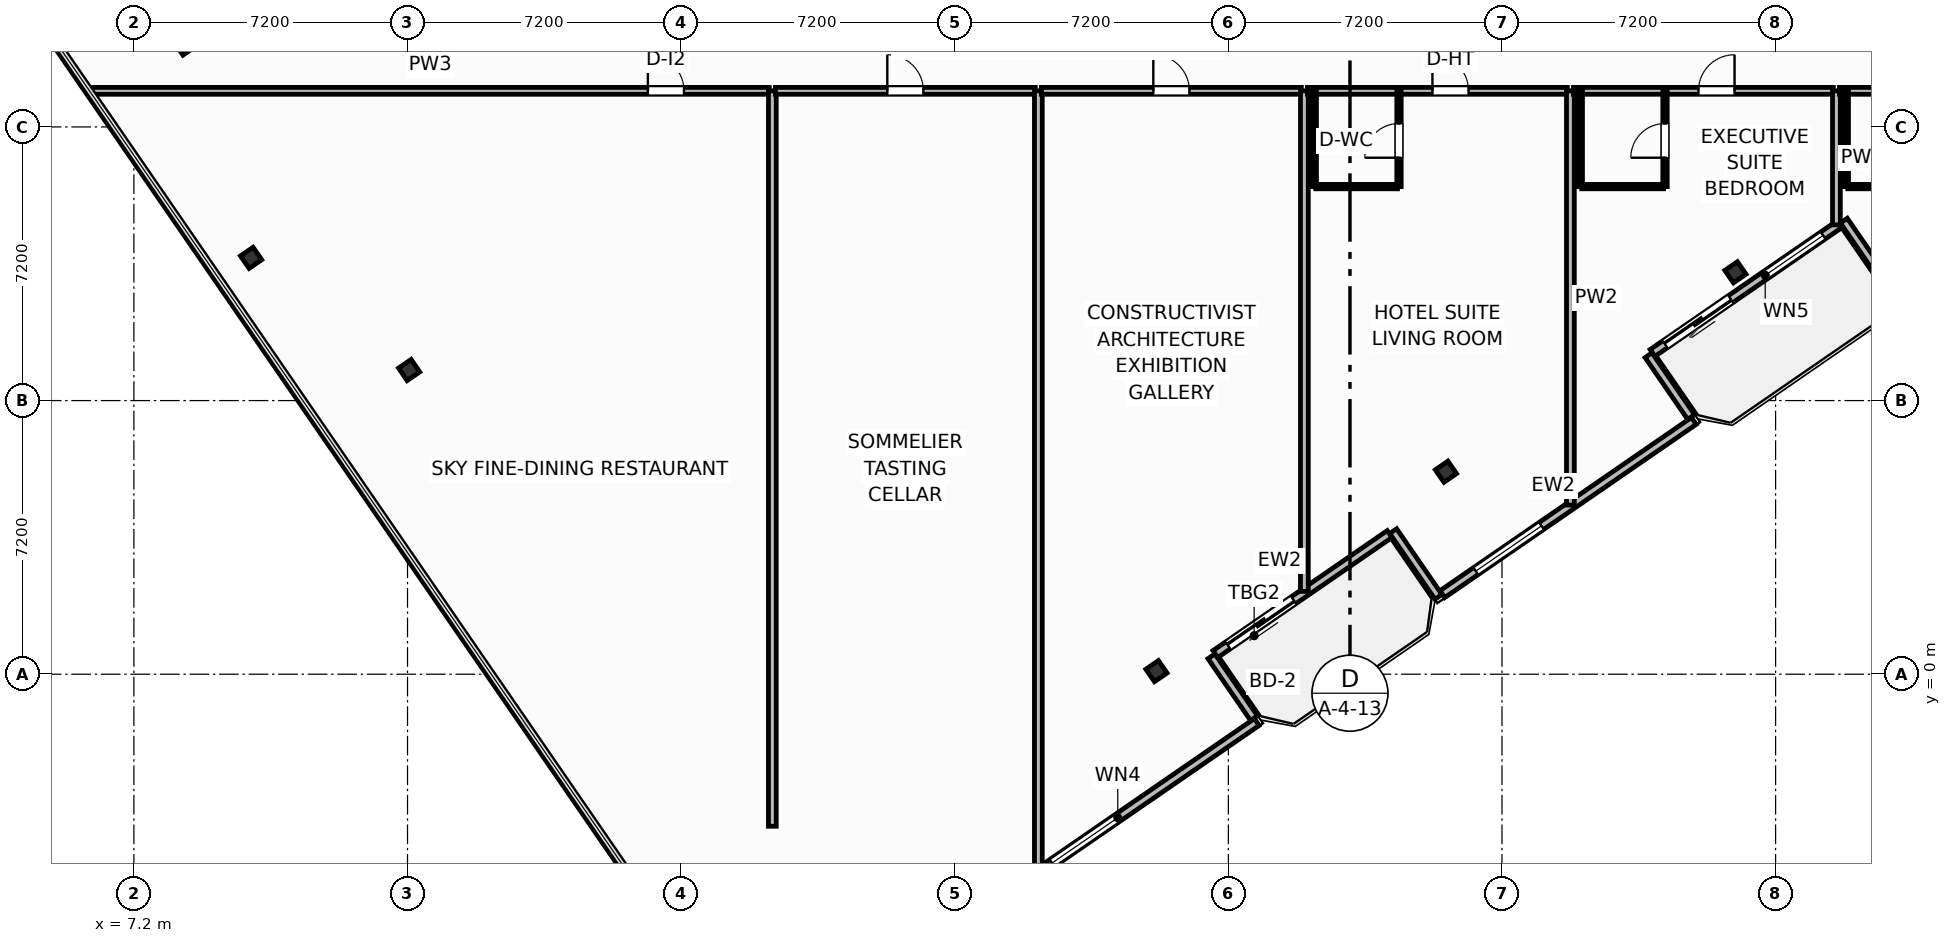
"""IFC4 building model, lengths in metres.
Left out: names, types, materials, properties, quantities, classifications, styles, units other than length and angle.
Written with IfcOpenShell. Run it as: python <this file> out.ifc"""

import sys

from ifc_helpers import new_model, si_unit, direction, frame, frame_2d, origin, origin_2d, place, context, subcontext, project, spatial, rectangle, i_section, extrude, element, fill, save


model = new_model("IFC4")
c1 = context("Model", 3, precision=1e-05, world=origin(), true_north=direction((0.0, 1.0)))
c2 = subcontext(c1, "Body", "Model", "MODEL_VIEW")
j1 = project(units=[si_unit("LENGTHUNIT", "METRE"), si_unit("PLANEANGLEUNIT", "RADIAN")], contexts=[c1])
p1 = place(None, origin())
s1 = spatial("IfcSite", under=j1, at=p1, CompositionType="ELEMENT")
p2 = place(p1, origin())
s2 = spatial("IfcBuilding", under=s1, at=p2, CompositionType="ELEMENT")
p3 = place(p2, frame((0.0, 0.0, 261.9)))
s3 = spatial("IfcBuildingStorey", under=s2, at=p3, CompositionType="ELEMENT", Elevation=261.9)
for number, where, z_axis, x_axis in (
    (1, (34.107, 0.081, 0.0), (0.0, 0.0, 1.0), (0.824, 0.567, 0.0)),
    (2, (41.725, 5.328, 0.0), (0.0, 0.0, 1.0), (0.824, 0.567, 0.0)),
    (3, (49.343, 10.575, 0.0), (0.0, 0.0, 1.0), (0.824, 0.567, 0.0)),
    (4, (8.543, 16.569, 0.0), (0.0, 0.0, 1.0), (0.824, 0.567, 0.0)),
    (5, (10.284, 10.956, 0.0), (0.0, 0.0, 1.0), (0.824, 0.567, 0.0)),
    (6, (14.443, 8.004, 0.0), (0.0, 0.0, 1.0), (0.824, 0.567, 0.0)),
):
    element("IfcColumn", number, at=place(p3, frame(where, z_axis=z_axis, x_axis=x_axis)), inside=s3, PredefinedType="COLUMN", context=c2, shape_type="SweptSolid", body=[
        extrude(i_section(OverallWidth=0.401, OverallDepth=0.399, WebThickness=0.025, FlangeThickness=0.04, FilletRadius=0.022, at=origin_2d()), origin(), (0.0, 0.0, 1.0), 3.7),
    ])
p4 = place(p3, frame((40.244, 3.688, 0.0), z_axis=(0.0, 0.0, 1.0), x_axis=(-0.823541290762, -0.567256328665, 0.0)))
e7 = element("IfcWall", 7, at=p4, inside=s3, PredefinedType="SOLIDWALL", context=c2, shape_type="SweptSolid", body=[
    extrude(rectangle(XDim=5.567, YDim=0.22, at=frame_2d((2.784, 0.0))), origin(), (0.0, 0.0, 1.0), 2.73),
])
p5 = place(p4, frame((3.067, 0.0, 0.0)))
e8 = element("IfcOpeningElement", 8, at=p5, cuts=e7, PredefinedType="OPENING", context=c2, shape_type="SweptSolid", body=[
    extrude(rectangle(XDim=2.1, YDim=2.3, at=frame_2d((1.05, 1.15))), frame((0.0, 0.12, 0.0), z_axis=(0.0, -1.0, 0.0), x_axis=(1.0, 0.0, 0.0)), (0.0, 0.0, 1.0), 0.24),
])
p6 = place(p3, frame((52.103, 11.857, 0.0), z_axis=(0.0, 0.0, 1.0), x_axis=(-0.823534636215, -0.567265989598, 0.0)))
e9 = element("IfcWall", 9, at=p6, inside=s3, PredefinedType="SOLIDWALL", context=c2, shape_type="SweptSolid", body=[
    extrude(rectangle(XDim=6.0, YDim=0.22, at=frame_2d((3.0, 0.0))), origin(), (0.0, 0.0, 1.0), 2.73),
])
p7 = place(p6, frame((3.5, 0.0, 0.0)))
e10 = element("IfcOpeningElement", 10, at=p7, cuts=e9, PredefinedType="OPENING", context=c2, shape_type="SweptSolid", body=[
    extrude(rectangle(XDim=2.1, YDim=2.3, at=frame_2d((1.05, 1.15))), frame((0.0, 0.12, 0.0), z_axis=(0.0, -1.0, 0.0), x_axis=(1.0, 0.0, 0.0)), (0.0, 0.0, 1.0), 0.24),
])
p8 = place(p6, frame((0.55, 0.0, 0.75)))
e11 = element("IfcOpeningElement", 11, at=p8, cuts=e9, PredefinedType="OPENING", context=c2, shape_type="SweptSolid", body=[
    extrude(rectangle(XDim=1.85, YDim=1.75, at=frame_2d((0.925, 0.875))), frame((0.0, 0.12, 0.0), z_axis=(0.0, -1.0, 0.0), x_axis=(1.0, 0.0, 0.0)), (0.0, 0.0, 1.0), 0.24),
])
p9 = place(p3, frame((27.704, -7.488, 0.0), z_axis=(0.0, 0.0, 1.0), x_axis=(0.823529068157, 0.567274073003, 0.0)))
e12 = element("IfcWall", 12, at=p9, inside=s3, PredefinedType="SOLIDWALL", context=c2, shape_type="SweptSolid", body=[
    extrude(rectangle(XDim=10.98, YDim=0.22, at=frame_2d((5.49, 0.0))), origin(), (0.0, 0.0, 1.0), 2.73),
])
p10 = place(p9, frame((4.44, 0.0, 0.8)))
e13 = element("IfcOpeningElement", 13, at=p10, cuts=e12, PredefinedType="OPENING", context=c2, shape_type="SweptSolid", body=[
    extrude(rectangle(XDim=2.1, YDim=1.75, at=frame_2d((1.05, 0.875))), frame((0.0, 0.12, 0.0), z_axis=(0.0, -1.0, 0.0), x_axis=(1.0, 0.0, 0.0)), (0.0, 0.0, 1.0), 0.24),
])
p11 = place(p3, frame((36.675, -1.156, 0.0), z_axis=(0.0, 0.0, 1.0), x_axis=(-0.567215821234, 0.823569190865, 0.0)))
e14 = element("IfcWall", 14, at=p11, inside=s3, PredefinedType="SOLIDWALL", context=c2, shape_type="SweptSolid", body=[
    extrude(rectangle(XDim=1.975, YDim=0.22, at=frame_2d((0.988, 0.0))), origin(), (0.0, 0.0, 1.0), 2.73),
])
p12 = place(p3, frame((40.337, 3.765, 0.0), z_axis=(0.0, 0.0, 1.0), x_axis=(0.567352541689, -0.823475010816, 0.0)))
e15 = element("IfcWall", 15, at=p12, inside=s3, PredefinedType="SOLIDWALL", context=c2, shape_type="SweptSolid", body=[
    extrude(rectangle(XDim=2.1, YDim=0.22, at=frame_2d((1.05, 0.0))), origin(), (0.0, 0.0, 1.0), 2.73),
])
p13 = place(p3, frame((41.631, 2.106, 0.0), z_axis=(0.0, 0.0, 1.0), x_axis=(0.823530942962, 0.56727135128, 0.0)))
e16 = element("IfcWall", 16, at=p13, inside=s3, PredefinedType="SOLIDWALL", context=c2, shape_type="SweptSolid", body=[
    extrude(rectangle(XDim=8.035, YDim=0.22, at=frame_2d((4.018, 0.0))), origin(), (0.0, 0.0, 1.0), 2.73),
])
p14 = place(p13, frame((1.068, 0.0, 0.8)))
e17 = element("IfcOpeningElement", 17, at=p14, cuts=e16, PredefinedType="OPENING", context=c2, shape_type="SweptSolid", body=[
    extrude(rectangle(XDim=2.1, YDim=1.75, at=frame_2d((1.05, 0.875))), frame((0.0, 0.12, 0.0), z_axis=(0.0, -1.0, 0.0), x_axis=(1.0, 0.0, 0.0)), (0.0, 0.0, 1.0), 0.24),
])
p15 = place(p3, frame((48.177, 6.767, 0.0), z_axis=(0.0, 0.0, 1.0), x_axis=(-0.567273565974, 0.823529417415, 0.0)))
e18 = element("IfcWall", 18, at=p15, inside=s3, PredefinedType="SOLIDWALL", context=c2, shape_type="SweptSolid", body=[
    extrude(rectangle(XDim=1.975, YDim=0.22, at=frame_2d((0.988, 0.0))), origin(), (0.0, 0.0, 1.0), 2.73),
])
p16 = place(p3, frame((52.196, 11.933, 0.0), z_axis=(0.0, 0.0, 1.0), x_axis=(0.56729822855, -0.823512428494, 0.0)))
e19 = element("IfcWall", 19, at=p16, inside=s3, PredefinedType="SOLIDWALL", context=c2, shape_type="SweptSolid", body=[
    extrude(rectangle(XDim=2.1, YDim=0.22, at=frame_2d((1.05, 0.0))), origin(), (0.0, 0.0, 1.0), 2.73),
])
p17 = place(p3, frame((6.071, 15.35, 0.0), z_axis=(0.0, 0.0, 1.0), x_axis=(1.0, 0.0, 0.0)))
e20 = element("IfcWall", 20, at=p17, inside=s3, PredefinedType="PARTITIONING", context=c2, shape_type="SweptSolid", body=[
    extrude(rectangle(XDim=17.849, YDim=0.18, at=frame_2d((8.924, 0.0))), origin(), (0.0, 0.0, 1.0), 3.45),
])
p18 = place(p17, frame((14.654, 0.0, 0.0)))
e21 = element("IfcOpeningElement", 21, at=p18, cuts=e20, PredefinedType="OPENING", context=c2, shape_type="SweptSolid", body=[
    extrude(rectangle(XDim=0.95, YDim=2.05, at=frame_2d((0.475, 1.025))), frame((0.0, 0.1, 0.0), z_axis=(0.0, -1.0, 0.0), x_axis=(1.0, 0.0, 0.0)), (0.0, 0.0, 1.0), 0.2),
])
p19 = place(p3, frame((24.0, -4.0, 0.0), z_axis=(0.0, 0.0, 1.0), x_axis=(0.0, 1.0, 0.0)))
e22 = element("IfcWall", 22, at=p19, inside=s3, PredefinedType="PARTITIONING", context=c2, shape_type="SweptSolid", body=[
    extrude(rectangle(XDim=19.35, YDim=0.205, at=frame_2d((9.675, 0.0))), origin(), (0.0, 0.0, 1.0), 3.45),
])
p20 = place(p3, frame((24.08, 15.35, 0.0), z_axis=(0.0, 0.0, 1.0), x_axis=(1.0, 0.0, 0.0)))
e23 = element("IfcWall", 23, at=p20, inside=s3, PredefinedType="PARTITIONING", context=c2, shape_type="SweptSolid", body=[
    extrude(rectangle(XDim=6.84, YDim=0.18, at=frame_2d((3.42, 0.0))), origin(), (0.0, 0.0, 1.0), 3.45),
])
p21 = place(p20, frame((2.945, 0.0, 0.0)))
e24 = element("IfcOpeningElement", 24, at=p21, cuts=e23, PredefinedType="OPENING", context=c2, shape_type="SweptSolid", body=[
    extrude(rectangle(XDim=0.95, YDim=2.05, at=frame_2d((0.475, 1.025))), frame((0.0, 0.1, 0.0), z_axis=(0.0, -1.0, 0.0), x_axis=(1.0, 0.0, 0.0)), (0.0, 0.0, 1.0), 0.2),
])
p22 = place(p3, frame((31.0, -5.112, 0.0), z_axis=(0.0, 0.0, 1.0), x_axis=(0.0, 1.0, 0.0)))
e25 = element("IfcWall", 25, at=p22, inside=s3, PredefinedType="PARTITIONING", context=c2, shape_type="SweptSolid", body=[
    extrude(rectangle(XDim=20.462, YDim=0.205, at=frame_2d((10.231, 0.0))), origin(), (0.0, 0.0, 1.0), 3.45),
])
p23 = place(p3, frame((31.08, 15.35, 0.0), z_axis=(0.0, 0.0, 1.0), x_axis=(1.0, 0.0, 0.0)))
e26 = element("IfcWall", 26, at=p23, inside=s3, PredefinedType="PARTITIONING", context=c2, shape_type="SweptSolid", body=[
    extrude(rectangle(XDim=6.84, YDim=0.18, at=frame_2d((3.42, 0.0))), origin(), (0.0, 0.0, 1.0), 3.45),
])
p24 = place(p23, frame((2.945, 0.0, 0.0)))
e27 = element("IfcOpeningElement", 27, at=p24, cuts=e26, PredefinedType="OPENING", context=c2, shape_type="SweptSolid", body=[
    extrude(rectangle(XDim=0.95, YDim=2.05, at=frame_2d((0.475, 1.025))), frame((0.0, 0.1, 0.0), z_axis=(0.0, -1.0, 0.0), x_axis=(1.0, 0.0, 0.0)), (0.0, 0.0, 1.0), 0.2),
])
p25 = place(p3, frame((38.0, 2.179, 0.0), z_axis=(0.0, 0.0, 1.0), x_axis=(0.0, 1.0, 0.0)))
e28 = element("IfcWall", 28, at=p25, inside=s3, PredefinedType="PARTITIONING", context=c2, shape_type="SweptSolid", body=[
    extrude(rectangle(XDim=13.171, YDim=0.205, at=frame_2d((6.585, 0.0))), origin(), (0.0, 0.0, 1.0), 3.45),
])
p26 = place(p3, frame((38.08, 15.35, 0.0), z_axis=(0.0, 0.0, 1.0), x_axis=(1.0, 0.0, 0.0)))
e29 = element("IfcWall", 29, at=p26, inside=s3, PredefinedType="PARTITIONING", context=c2, shape_type="SweptSolid", body=[
    extrude(rectangle(XDim=6.84, YDim=0.18, at=frame_2d((3.42, 0.0))), origin(), (0.0, 0.0, 1.0), 3.45),
])
p27 = place(p26, frame((3.29, 0.0, 0.0)))
e30 = element("IfcOpeningElement", 30, at=p27, cuts=e29, PredefinedType="OPENING", context=c2, shape_type="SweptSolid", body=[
    extrude(rectangle(XDim=0.95, YDim=2.15, at=frame_2d((0.475, 1.075))), frame((0.0, 0.1, 0.0), z_axis=(0.0, -1.0, 0.0), x_axis=(1.0, 0.0, 0.0)), (0.0, 0.0, 1.0), 0.2),
])
p28 = place(p3, frame((38.3, 12.83, 0.0), z_axis=(0.0, 0.0, 1.0), x_axis=(1.0, 0.0, 0.0)))
e31 = element("IfcWall", 31, at=p28, inside=s3, PredefinedType="PARTITIONING", context=c2, shape_type="SweptSolid", body=[
    extrude(rectangle(XDim=2.15, YDim=0.115, at=frame_2d((1.075, 0.0))), origin(), (0.0, 0.0, 1.0), 3.45),
])
p29 = place(p3, frame((40.49, 12.83, 0.0), z_axis=(0.0, 0.0, 1.0), x_axis=(0.0, 1.0, 0.0)))
e32 = element("IfcWall", 32, at=p29, inside=s3, PredefinedType="PARTITIONING", context=c2, shape_type="SweptSolid", body=[
    extrude(rectangle(XDim=2.52, YDim=0.115, at=frame_2d((1.26, 0.0))), origin(), (0.0, 0.0, 1.0), 3.45),
])
p30 = place(p29, frame((0.76, 0.0, 0.0)))
e33 = element("IfcOpeningElement", 33, at=p30, cuts=e32, PredefinedType="OPENING", context=c2, shape_type="SweptSolid", body=[
    extrude(rectangle(XDim=0.9, YDim=2.05, at=frame_2d((0.45, 1.025))), frame((0.0, 0.067, 0.0), z_axis=(0.0, -1.0, 0.0), x_axis=(1.0, 0.0, 0.0)), (0.0, 0.0, 1.0), 0.135),
])
p31 = place(p3, frame((38.26, 12.83, 0.0), z_axis=(0.0, 0.0, 1.0), x_axis=(0.0, 1.0, 0.0)))
e34 = element("IfcWall", 34, at=p31, inside=s3, PredefinedType="PARTITIONING", context=c2, shape_type="SweptSolid", body=[
    extrude(rectangle(XDim=2.52, YDim=0.115, at=frame_2d((1.26, 0.0))), origin(), (0.0, 0.0, 1.0), 3.45),
])
p32 = place(p3, frame((45.0, 4.451, 0.0), z_axis=(0.0, 0.0, 1.0), x_axis=(0.0, 1.0, 0.0)))
e35 = element("IfcWall", 35, at=p32, inside=s3, PredefinedType="PARTITIONING", context=c2, shape_type="SweptSolid", body=[
    extrude(rectangle(XDim=10.899, YDim=0.205, at=frame_2d((5.45, 0.0))), origin(), (0.0, 0.0, 1.0), 3.45),
])
p33 = place(p3, frame((45.08, 15.35, 0.0), z_axis=(0.0, 0.0, 1.0), x_axis=(1.0, 0.0, 0.0)))
e36 = element("IfcWall", 36, at=p33, inside=s3, PredefinedType="PARTITIONING", context=c2, shape_type="SweptSolid", body=[
    extrude(rectangle(XDim=6.84, YDim=0.18, at=frame_2d((3.42, 0.0))), origin(), (0.0, 0.0, 1.0), 3.45),
])
p34 = place(p33, frame((3.29, 0.0, 0.0)))
e37 = element("IfcOpeningElement", 37, at=p34, cuts=e36, PredefinedType="OPENING", context=c2, shape_type="SweptSolid", body=[
    extrude(rectangle(XDim=0.95, YDim=2.15, at=frame_2d((0.475, 1.075))), frame((0.0, 0.1, 0.0), z_axis=(0.0, -1.0, 0.0), x_axis=(1.0, 0.0, 0.0)), (0.0, 0.0, 1.0), 0.2),
])
p35 = place(p3, frame((45.3, 12.83, 0.0), z_axis=(0.0, 0.0, 1.0), x_axis=(1.0, 0.0, 0.0)))
e38 = element("IfcWall", 38, at=p35, inside=s3, PredefinedType="PARTITIONING", context=c2, shape_type="SweptSolid", body=[
    extrude(rectangle(XDim=2.15, YDim=0.115, at=frame_2d((1.075, 0.0))), origin(), (0.0, 0.0, 1.0), 3.018),
])
p36 = place(p3, frame((47.49, 12.83, 0.0), z_axis=(0.0, 0.0, 1.0), x_axis=(0.0, 1.0, 0.0)))
e39 = element("IfcWall", 39, at=p36, inside=s3, PredefinedType="PARTITIONING", context=c2, shape_type="SweptSolid", body=[
    extrude(rectangle(XDim=2.52, YDim=0.115, at=frame_2d((1.26, 0.0))), origin(), (0.0, 0.0, 1.0), 3.45),
])
p37 = place(p36, frame((0.76, 0.0, 0.0)))
e40 = element("IfcOpeningElement", 40, at=p37, cuts=e39, PredefinedType="OPENING", context=c2, shape_type="SweptSolid", body=[
    extrude(rectangle(XDim=0.9, YDim=2.05, at=frame_2d((0.45, 1.025))), frame((0.0, 0.067, 0.0), z_axis=(0.0, -1.0, 0.0), x_axis=(1.0, 0.0, 0.0)), (0.0, 0.0, 1.0), 0.135),
])
p38 = place(p3, frame((45.26, 12.83, 0.0), z_axis=(0.0, 0.0, 1.0), x_axis=(0.0, 1.0, 0.0)))
e41 = element("IfcWall", 41, at=p38, inside=s3, PredefinedType="PARTITIONING", context=c2, shape_type="SweptSolid", body=[
    extrude(rectangle(XDim=2.52, YDim=0.115, at=frame_2d((1.26, 0.0))), origin(), (0.0, 0.0, 1.0), 3.45),
])
p39 = place(p3, frame((52.0, 11.823, 0.0), z_axis=(0.0, 0.0, 1.0), x_axis=(0.0, 1.0, 0.0)))
e42 = element("IfcWall", 42, at=p39, inside=s3, PredefinedType="PARTITIONING", context=c2, shape_type="SweptSolid", body=[
    extrude(rectangle(XDim=3.527, YDim=0.205, at=frame_2d((1.764, 0.0))), origin(), (0.0, 0.0, 1.0), 3.45),
])
p40 = place(p3, frame((52.08, 15.35, 0.0), z_axis=(0.0, 0.0, 1.0), x_axis=(1.0, 0.0, 0.0)))
e43 = element("IfcWall", 43, at=p40, inside=s3, PredefinedType="PARTITIONING", context=c2, shape_type="SweptSolid", body=[
    extrude(rectangle(XDim=7.646, YDim=0.18, at=frame_2d((3.823, 0.0))), origin(), (0.0, 0.0, 1.0), 3.45),
])
p41 = place(p40, frame((3.311, 0.0, 0.0)))
e44 = element("IfcOpeningElement", 44, at=p41, cuts=e43, PredefinedType="OPENING", context=c2, shape_type="SweptSolid", body=[
    extrude(rectangle(XDim=0.95, YDim=2.15, at=frame_2d((0.475, 1.075))), frame((0.0, 0.1, 0.0), z_axis=(0.0, -1.0, 0.0), x_axis=(1.0, 0.0, 0.0)), (0.0, 0.0, 1.0), 0.2),
])
p42 = place(p3, frame((52.3, 12.83, 0.0), z_axis=(0.0, 0.0, 1.0), x_axis=(1.0, 0.0, 0.0)))
e45 = element("IfcWall", 45, at=p42, inside=s3, PredefinedType="PARTITIONING", context=c2, shape_type="SweptSolid", body=[
    extrude(rectangle(XDim=2.15, YDim=0.115, at=frame_2d((1.075, 0.0))), origin(), (0.0, 0.0, 1.0), 3.45),
])
p43 = place(p3, frame((52.26, 12.83, 0.0), z_axis=(0.0, 0.0, 1.0), x_axis=(0.0, 1.0, 0.0)))
e46 = element("IfcWall", 46, at=p43, inside=s3, PredefinedType="PARTITIONING", context=c2, shape_type="SweptSolid", body=[
    extrude(rectangle(XDim=2.52, YDim=0.115, at=frame_2d((1.26, 0.0))), origin(), (0.0, 0.0, 1.0), 3.45),
])
p44 = place(p5, origin())
e47 = element("IfcDoor", 47, at=p44, inside=s3, OperationType="SLIDING_TO_LEFT", PredefinedType="DOOR", context=c2, shape_type="SweptSolid", body=[
    extrude(rectangle(XDim=2.1, YDim=2.3, at=frame_2d((1.05, 1.15))), frame((0.0, 0.025, 0.0), z_axis=(0.0, -1.0, 0.0), x_axis=(1.0, 0.0, 0.0)), (0.0, 0.0, 1.0), 0.05),
])
fill(e8, e47)
p45 = place(p7, origin())
e48 = element("IfcDoor", 48, at=p45, inside=s3, OperationType="SLIDING_TO_LEFT", PredefinedType="DOOR", context=c2, shape_type="SweptSolid", body=[
    extrude(rectangle(XDim=2.1, YDim=2.3, at=frame_2d((1.05, 1.15))), frame((0.0, 0.025, 0.0), z_axis=(0.0, -1.0, 0.0), x_axis=(1.0, 0.0, 0.0)), (0.0, 0.0, 1.0), 0.05),
])
fill(e10, e48)
p46 = place(p8, origin())
e49 = element("IfcWindow", 49, at=p46, inside=s3, PartitioningType="SINGLE_PANEL", PredefinedType="WINDOW", context=c2, shape_type="SweptSolid", body=[
    extrude(rectangle(XDim=1.85, YDim=1.75, at=frame_2d((0.925, 0.875))), frame((0.0, 0.03, 0.0), z_axis=(0.0, -1.0, 0.0), x_axis=(1.0, 0.0, 0.0)), (0.0, 0.0, 1.0), 0.06),
])
fill(e11, e49)
p47 = place(p10, origin())
e50 = element("IfcWindow", 50, at=p47, inside=s3, PartitioningType="SINGLE_PANEL", PredefinedType="WINDOW", context=c2, shape_type="SweptSolid", body=[
    extrude(rectangle(XDim=2.1, YDim=1.75, at=frame_2d((1.05, 0.875))), frame((0.0, 0.03, 0.0), z_axis=(0.0, -1.0, 0.0), x_axis=(1.0, 0.0, 0.0)), (0.0, 0.0, 1.0), 0.06),
])
fill(e13, e50)
p48 = place(p14, origin())
e51 = element("IfcWindow", 51, at=p48, inside=s3, PartitioningType="SINGLE_PANEL", PredefinedType="WINDOW", context=c2, shape_type="SweptSolid", body=[
    extrude(rectangle(XDim=2.1, YDim=1.75, at=frame_2d((1.05, 0.875))), frame((0.0, 0.03, 0.0), z_axis=(0.0, -1.0, 0.0), x_axis=(1.0, 0.0, 0.0)), (0.0, 0.0, 1.0), 0.06),
])
fill(e17, e51)
p49 = place(p18, origin())
e52 = element("IfcDoor", 52, at=p49, inside=s3, OperationType="SINGLE_SWING_LEFT", PredefinedType="DOOR", context=c2, shape_type="SweptSolid", body=[
    extrude(rectangle(XDim=0.95, YDim=2.05, at=frame_2d((0.475, 1.025))), frame((0.0, 0.025, 0.0), z_axis=(0.0, -1.0, 0.0), x_axis=(1.0, 0.0, 0.0)), (0.0, 0.0, 1.0), 0.05),
])
fill(e21, e52)
p50 = place(p21, origin())
e53 = element("IfcDoor", 53, at=p50, inside=s3, OperationType="SINGLE_SWING_LEFT", PredefinedType="DOOR", context=c2, shape_type="SweptSolid", body=[
    extrude(rectangle(XDim=0.95, YDim=2.05, at=frame_2d((0.475, 1.025))), frame((0.0, 0.025, 0.0), z_axis=(0.0, -1.0, 0.0), x_axis=(1.0, 0.0, 0.0)), (0.0, 0.0, 1.0), 0.05),
])
fill(e24, e53)
p51 = place(p24, origin())
e54 = element("IfcDoor", 54, at=p51, inside=s3, OperationType="SINGLE_SWING_LEFT", PredefinedType="DOOR", context=c2, shape_type="SweptSolid", body=[
    extrude(rectangle(XDim=0.95, YDim=2.05, at=frame_2d((0.475, 1.025))), frame((0.0, 0.025, 0.0), z_axis=(0.0, -1.0, 0.0), x_axis=(1.0, 0.0, 0.0)), (0.0, 0.0, 1.0), 0.05),
])
fill(e27, e54)
p52 = place(p27, origin())
e55 = element("IfcDoor", 55, at=p52, inside=s3, OperationType="SINGLE_SWING_LEFT", PredefinedType="DOOR", context=c2, shape_type="SweptSolid", body=[
    extrude(rectangle(XDim=0.95, YDim=2.15, at=frame_2d((0.475, 1.075))), frame((0.0, 0.025, 0.0), z_axis=(0.0, -1.0, 0.0), x_axis=(1.0, 0.0, 0.0)), (0.0, 0.0, 1.0), 0.05),
])
fill(e30, e55)
p53 = place(p30, origin())
e56 = element("IfcDoor", 56, at=p53, inside=s3, OperationType="SINGLE_SWING_LEFT", PredefinedType="DOOR", context=c2, shape_type="SweptSolid", body=[
    extrude(rectangle(XDim=0.9, YDim=2.05, at=frame_2d((0.45, 1.025))), frame((0.0, 0.025, 0.0), z_axis=(0.0, -1.0, 0.0), x_axis=(1.0, 0.0, 0.0)), (0.0, 0.0, 1.0), 0.05),
])
fill(e33, e56)
p54 = place(p34, origin())
e57 = element("IfcDoor", 57, at=p54, inside=s3, OperationType="SINGLE_SWING_RIGHT", PredefinedType="DOOR", context=c2, shape_type="SweptSolid", body=[
    extrude(rectangle(XDim=0.95, YDim=2.15, at=frame_2d((0.475, 1.075))), frame((0.0, 0.025, 0.0), z_axis=(0.0, -1.0, 0.0), x_axis=(1.0, 0.0, 0.0)), (0.0, 0.0, 1.0), 0.05),
])
fill(e37, e57)
p55 = place(p37, origin())
e58 = element("IfcDoor", 58, at=p55, inside=s3, OperationType="SINGLE_SWING_LEFT", PredefinedType="DOOR", context=c2, shape_type="SweptSolid", body=[
    extrude(rectangle(XDim=0.9, YDim=2.05, at=frame_2d((0.45, 1.025))), frame((0.0, 0.025, 0.0), z_axis=(0.0, -1.0, 0.0), x_axis=(1.0, 0.0, 0.0)), (0.0, 0.0, 1.0), 0.05),
])
fill(e40, e58)
save(model, sys.argv[1])
